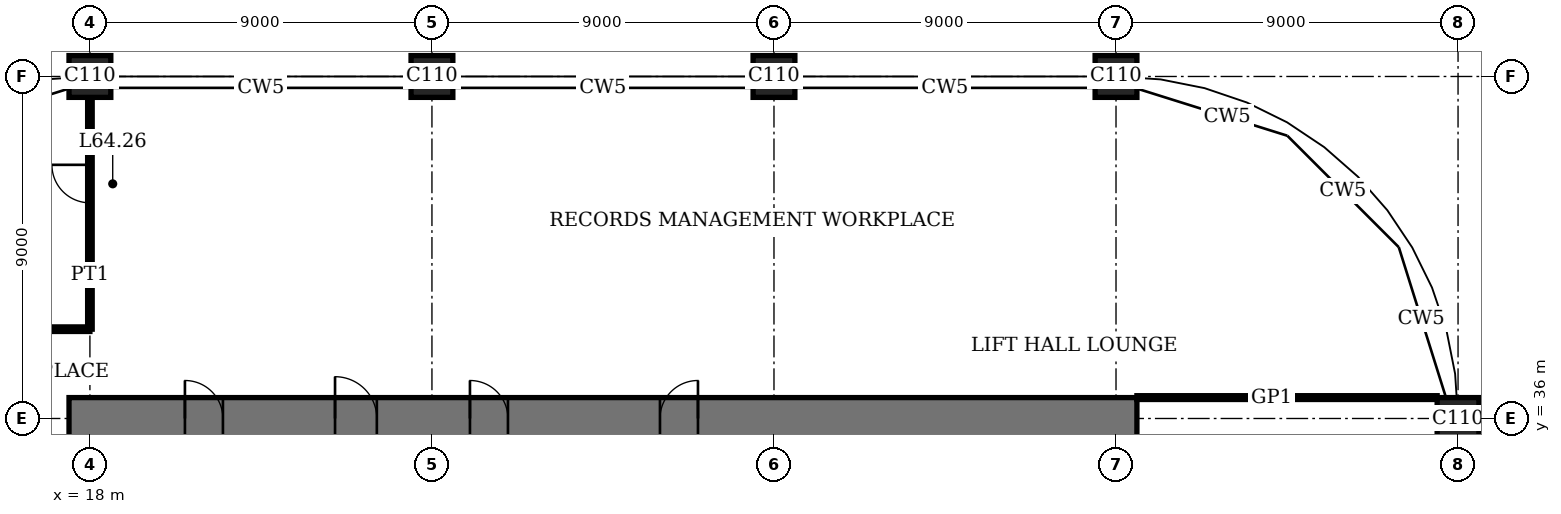
"""IFC4 building model, lengths in metres.
Left out: names, types, materials, properties, quantities, classifications, styles, units other than length and angle.
Written with IfcOpenShell. Run it as: python <this file> out.ifc"""

import sys

from ifc_helpers import new_model, si_unit, direction, frame, frame_2d, origin, origin_2d, place, context, subcontext, project, spatial, rectangle, extrude, element, fill, save


model = new_model("IFC4")
c1 = context("Model", 3, precision=1e-05, world=origin(), true_north=direction((0.0, 1.0)))
c2 = subcontext(c1, "Body", "Model", "MODEL_VIEW")
j1 = project(units=[si_unit("LENGTHUNIT", "METRE"), si_unit("PLANEANGLEUNIT", "RADIAN")], contexts=[c1])
p1 = place(None, origin())
s1 = spatial("IfcSite", under=j1, at=p1, CompositionType="ELEMENT")
p2 = place(p1, origin())
s2 = spatial("IfcBuilding", under=s1, at=p2, CompositionType="ELEMENT")
p3 = place(p2, frame((0.0, 0.0, 263.4)))
s3 = spatial("IfcBuildingStorey", under=s2, at=p3, CompositionType="ELEMENT", Elevation=263.4)
for number, where, z_axis, x_axis in (
    (1, (18.0, 45.0, 0.0), (0.0, 0.0, 1.0), (1.0, 0.0, 0.0)),
    (2, (27.0, 45.0, 0.0), (0.0, 0.0, 1.0), (1.0, 0.0, 0.0)),
    (3, (36.0, 45.0, 0.0), (0.0, 0.0, 1.0), (1.0, 0.0, 0.0)),
    (4, (45.0, 45.0, 0.0), (0.0, 0.0, 1.0), (1.0, 0.0, 0.0)),
    (5, (54.0, 36.0, 0.0), (0.0, 0.0, 1.0), (1.0, 0.0, 0.0)),
):
    element("IfcColumn", number, at=place(p3, frame(where, z_axis=z_axis, x_axis=x_axis)), inside=s3, PredefinedType="COLUMN", context=c2, shape_type="SweptSolid", body=[
        extrude(rectangle(XDim=1.1, YDim=1.1, at=origin_2d()), origin(), (0.0, 0.0, 1.0), 4.0),
    ])
p4 = place(p3, frame((45.55, 36.0, 0.0), z_axis=(0.0, 0.0, 1.0), x_axis=(-1.0, 0.0, 0.0)))
e6 = element("IfcWall", 6, at=p4, inside=s3, PredefinedType="SHEAR", context=c2, shape_type="SweptSolid", body=[
    extrude(rectangle(XDim=28.1, YDim=1.1, at=frame_2d((14.05, 0.0))), origin(), (0.0, 0.0, 1.0), 4.0),
])
p5 = place(p4, frame((11.55, 0.0, 0.0)))
e7 = element("IfcOpeningElement", 7, at=p5, cuts=e6, PredefinedType="OPENING", context=c2, shape_type="SweptSolid", body=[
    extrude(rectangle(XDim=1.0, YDim=2.4, at=frame_2d((0.5, 1.2))), frame((0.0, 0.56, 0.0), z_axis=(0.0, -1.0, 0.0), x_axis=(1.0, 0.0, 0.0)), (0.0, 0.0, 1.0), 1.12),
])
p6 = place(p4, frame((16.55, 0.0, 0.0)))
e8 = element("IfcOpeningElement", 8, at=p6, cuts=e6, PredefinedType="OPENING", context=c2, shape_type="SweptSolid", body=[
    extrude(rectangle(XDim=1.0, YDim=2.4, at=frame_2d((0.5, 1.2))), frame((0.0, 0.56, 0.0), z_axis=(0.0, -1.0, 0.0), x_axis=(1.0, 0.0, 0.0)), (0.0, 0.0, 1.0), 1.12),
])
p7 = place(p4, frame((20.0, 0.0, 0.0)))
e9 = element("IfcOpeningElement", 9, at=p7, cuts=e6, PredefinedType="OPENING", context=c2, shape_type="SweptSolid", body=[
    extrude(rectangle(XDim=1.1, YDim=2.4, at=frame_2d((0.55, 1.2))), frame((0.0, 0.56, 0.0), z_axis=(0.0, -1.0, 0.0), x_axis=(1.0, 0.0, 0.0)), (0.0, 0.0, 1.0), 1.12),
])
p8 = place(p4, frame((24.05, 0.0, 0.0)))
e10 = element("IfcOpeningElement", 10, at=p8, cuts=e6, PredefinedType="OPENING", context=c2, shape_type="SweptSolid", body=[
    extrude(rectangle(XDim=1.0, YDim=2.4, at=frame_2d((0.5, 1.2))), frame((0.0, 0.56, 0.0), z_axis=(0.0, -1.0, 0.0), x_axis=(1.0, 0.0, 0.0)), (0.0, 0.0, 1.0), 1.12),
])
p9 = place(p3, frame((45.55, 36.55, 0.0), z_axis=(0.0, 0.0, 1.0), x_axis=(1.0, 0.0, 0.0)))
e11 = element("IfcWall", 11, at=p9, inside=s3, PredefinedType="PARTITIONING", context=c2, shape_type="SweptSolid", body=[
    extrude(rectangle(XDim=7.9, YDim=0.1, at=frame_2d((3.95, 0.0))), origin(), (0.0, 0.0, 1.0), 3.75),
])
p10 = place(p3, frame((9.918, 38.35, 0.0), z_axis=(0.0, 0.0, 1.0), x_axis=(1.0, 0.0, 0.0)))
e12 = element("IfcWall", 12, at=p10, inside=s3, PredefinedType="PARTITIONING", context=c2, shape_type="SweptSolid", body=[
    extrude(rectangle(XDim=8.082, YDim=0.12, at=frame_2d((4.041, 0.0))), origin(), (0.0, 0.0, 1.0), 3.75),
])
p11 = place(p3, frame((18.0, 38.35, 0.0), z_axis=(0.0, 0.0, 1.0), x_axis=(0.0, 1.0, 0.0)))
e13 = element("IfcWall", 13, at=p11, inside=s3, PredefinedType="PARTITIONING", context=c2, shape_type="SweptSolid", body=[
    extrude(rectangle(XDim=6.1, YDim=0.12, at=frame_2d((3.05, 0.0))), origin(), (0.0, 0.0, 1.0), 3.05),
])
p12 = place(p11, frame((3.325, 0.0, 0.0)))
e14 = element("IfcOpeningElement", 14, at=p12, cuts=e13, PredefinedType="OPENING", context=c2, shape_type="SweptSolid", body=[
    extrude(rectangle(XDim=1.0, YDim=2.4, at=frame_2d((0.5, 1.2))), frame((0.0, 0.07, 0.0), z_axis=(0.0, -1.0, 0.0), x_axis=(1.0, 0.0, 0.0)), (0.0, 0.0, 1.0), 0.14),
])
p13 = place(p5, origin())
e15 = element("IfcDoor", 15, at=p13, inside=s3, OperationType="SINGLE_SWING_LEFT", PredefinedType="DOOR", context=c2, shape_type="SweptSolid", body=[
    extrude(rectangle(XDim=1.0, YDim=2.4, at=frame_2d((0.5, 1.2))), frame((0.0, 0.025, 0.0), z_axis=(0.0, -1.0, 0.0), x_axis=(1.0, 0.0, 0.0)), (0.0, 0.0, 1.0), 0.05),
    extrude(rectangle(XDim=0.04, YDim=2.4, at=frame_2d((0.02, 1.2))), frame((0.0, 0.4, 0.0), z_axis=(0.0, -1.0, 0.0), x_axis=(1.0, 0.0, 0.0)), (0.0, 0.0, 1.0), 0.8),
    extrude(rectangle(XDim=0.04, YDim=2.4, at=frame_2d((0.98, 1.2))), frame((0.0, 0.4, 0.0), z_axis=(0.0, -1.0, 0.0), x_axis=(1.0, 0.0, 0.0)), (0.0, 0.0, 1.0), 0.8),
    extrude(rectangle(XDim=1.0, YDim=0.04, at=frame_2d((0.5, 2.38))), frame((0.0, 0.4, 0.0), z_axis=(0.0, -1.0, 0.0), x_axis=(1.0, 0.0, 0.0)), (0.0, 0.0, 1.0), 0.8),
])
fill(e7, e15)
p14 = place(p6, origin())
e16 = element("IfcDoor", 16, at=p14, inside=s3, OperationType="SINGLE_SWING_RIGHT", PredefinedType="DOOR", context=c2, shape_type="SweptSolid", body=[
    extrude(rectangle(XDim=1.0, YDim=2.4, at=frame_2d((0.5, 1.2))), frame((0.0, 0.025, 0.0), z_axis=(0.0, -1.0, 0.0), x_axis=(1.0, 0.0, 0.0)), (0.0, 0.0, 1.0), 0.05),
    extrude(rectangle(XDim=0.04, YDim=2.4, at=frame_2d((0.02, 1.2))), frame((0.0, 0.4, 0.0), z_axis=(0.0, -1.0, 0.0), x_axis=(1.0, 0.0, 0.0)), (0.0, 0.0, 1.0), 0.8),
    extrude(rectangle(XDim=0.04, YDim=2.4, at=frame_2d((0.98, 1.2))), frame((0.0, 0.4, 0.0), z_axis=(0.0, -1.0, 0.0), x_axis=(1.0, 0.0, 0.0)), (0.0, 0.0, 1.0), 0.8),
    extrude(rectangle(XDim=1.0, YDim=0.04, at=frame_2d((0.5, 2.38))), frame((0.0, 0.4, 0.0), z_axis=(0.0, -1.0, 0.0), x_axis=(1.0, 0.0, 0.0)), (0.0, 0.0, 1.0), 0.8),
])
fill(e8, e16)
p15 = place(p7, origin())
e17 = element("IfcDoor", 17, at=p15, inside=s3, OperationType="SINGLE_SWING_RIGHT", PredefinedType="DOOR", context=c2, shape_type="SweptSolid", body=[
    extrude(rectangle(XDim=1.1, YDim=2.4, at=frame_2d((0.55, 1.2))), frame((0.0, 0.025, 0.0), z_axis=(0.0, -1.0, 0.0), x_axis=(1.0, 0.0, 0.0)), (0.0, 0.0, 1.0), 0.05),
    extrude(rectangle(XDim=0.04, YDim=2.4, at=frame_2d((0.02, 1.2))), frame((0.0, 0.44, 0.0), z_axis=(0.0, -1.0, 0.0), x_axis=(1.0, 0.0, 0.0)), (0.0, 0.0, 1.0), 0.88),
    extrude(rectangle(XDim=0.04, YDim=2.4, at=frame_2d((1.08, 1.2))), frame((0.0, 0.44, 0.0), z_axis=(0.0, -1.0, 0.0), x_axis=(1.0, 0.0, 0.0)), (0.0, 0.0, 1.0), 0.88),
    extrude(rectangle(XDim=1.1, YDim=0.04, at=frame_2d((0.55, 2.38))), frame((0.0, 0.44, 0.0), z_axis=(0.0, -1.0, 0.0), x_axis=(1.0, 0.0, 0.0)), (0.0, 0.0, 1.0), 0.88),
])
fill(e9, e17)
p16 = place(p8, origin())
e18 = element("IfcDoor", 18, at=p16, inside=s3, OperationType="SINGLE_SWING_RIGHT", PredefinedType="DOOR", context=c2, shape_type="SweptSolid", body=[
    extrude(rectangle(XDim=1.0, YDim=2.4, at=frame_2d((0.5, 1.2))), frame((0.0, 0.025, 0.0), z_axis=(0.0, -1.0, 0.0), x_axis=(1.0, 0.0, 0.0)), (0.0, 0.0, 1.0), 0.05),
    extrude(rectangle(XDim=0.04, YDim=2.4, at=frame_2d((0.02, 1.2))), frame((0.0, 0.4, 0.0), z_axis=(0.0, -1.0, 0.0), x_axis=(1.0, 0.0, 0.0)), (0.0, 0.0, 1.0), 0.8),
    extrude(rectangle(XDim=0.04, YDim=2.4, at=frame_2d((0.98, 1.2))), frame((0.0, 0.4, 0.0), z_axis=(0.0, -1.0, 0.0), x_axis=(1.0, 0.0, 0.0)), (0.0, 0.0, 1.0), 0.8),
    extrude(rectangle(XDim=1.0, YDim=0.04, at=frame_2d((0.5, 2.38))), frame((0.0, 0.4, 0.0), z_axis=(0.0, -1.0, 0.0), x_axis=(1.0, 0.0, 0.0)), (0.0, 0.0, 1.0), 0.8),
])
fill(e10, e18)
p17 = place(p12, origin())
e19 = element("IfcDoor", 19, at=p17, inside=s3, OperationType="SINGLE_SWING_LEFT", PredefinedType="DOOR", context=c2, shape_type="SweptSolid", body=[
    extrude(rectangle(XDim=1.0, YDim=2.4, at=frame_2d((0.5, 1.2))), frame((0.0, 0.025, 0.0), z_axis=(0.0, -1.0, 0.0), x_axis=(1.0, 0.0, 0.0)), (0.0, 0.0, 1.0), 0.05),
])
fill(e14, e19)
save(model, sys.argv[1])
